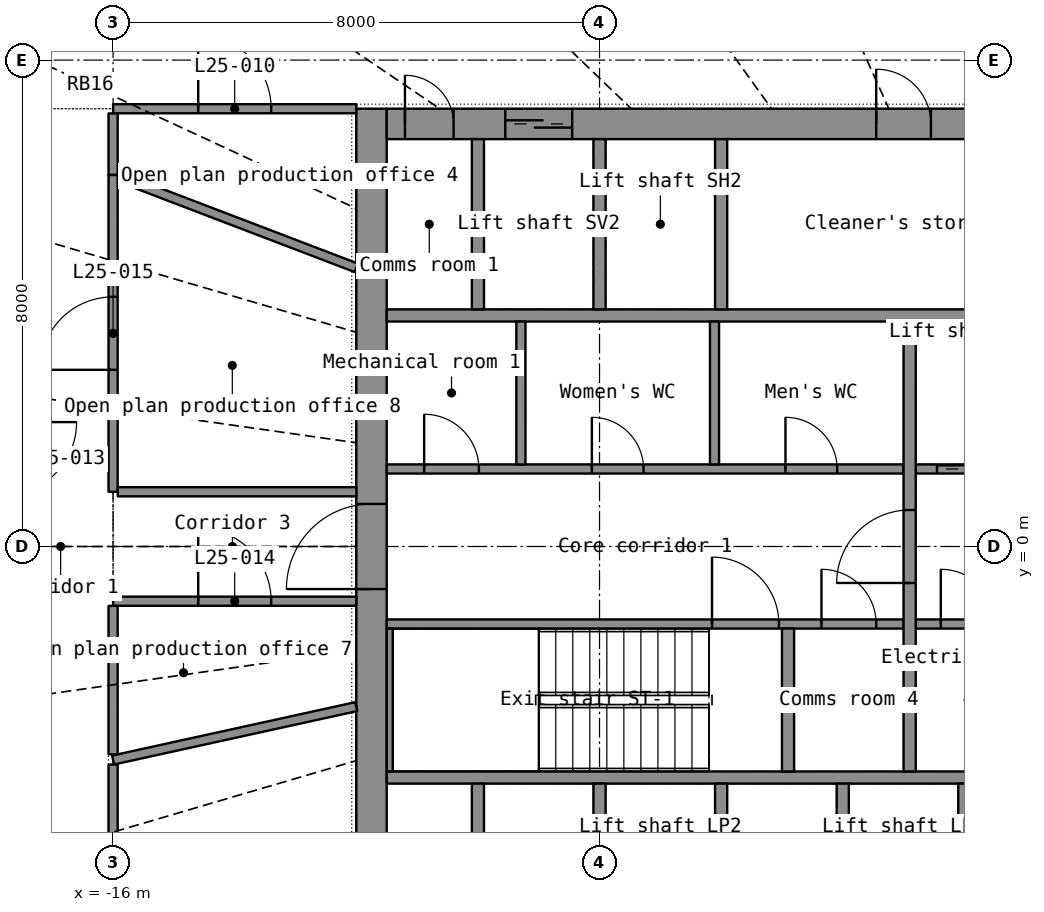
"""IFC4 building model, lengths in metres.
Left out: names, types, materials, properties, quantities, classifications, styles, units other than length and angle.
Written with IfcOpenShell. Run it as: python <this file> out.ifc"""

import sys

from ifc_helpers import new_model, si_unit, direction, frame, frame_2d, origin, place, context, subcontext, project, spatial, rectangle, extrude, element, fill, save


model = new_model("IFC4")
c1 = context("Model", 3, precision=1e-05, world=origin(), true_north=direction((0.0, 1.0)))
c2 = subcontext(c1, "Body", "Model", "MODEL_VIEW")
j1 = project(units=[si_unit("LENGTHUNIT", "METRE"), si_unit("PLANEANGLEUNIT", "RADIAN")], contexts=[c1])
p1 = place(None, origin())
s1 = spatial("IfcSite", under=j1, at=p1, CompositionType="ELEMENT")
p2 = place(p1, origin())
s2 = spatial("IfcBuilding", under=s1, at=p2, CompositionType="ELEMENT")
p3 = place(p2, frame((0.0, 0.0, 108.2)))
s3 = spatial("IfcBuildingStorey", under=s2, at=p3, CompositionType="ELEMENT", Elevation=108.2)
p4 = place(p3, frame((-11.75, -7.2, 0.0), z_axis=(0.0, 0.0, 1.0), x_axis=(0.0, 1.0, 0.0)))
e1 = element("IfcWall", 1, at=p4, inside=s3, PredefinedType="SHEAR", context=c2, shape_type="SweptSolid", body=[
    extrude(rectangle(XDim=14.4, YDim=0.5, at=frame_2d((7.2, 0.0))), origin(), (0.0, 0.0, 1.0), 3.3),
])
p5 = place(p4, frame((6.5, 0.0, 0.0)))
e2 = element("IfcOpeningElement", 2, at=p5, cuts=e1, PredefinedType="OPENING", context=c2, shape_type="SweptSolid", body=[
    extrude(rectangle(XDim=1.4, YDim=2.2, at=frame_2d((0.7, 1.1))), frame((0.0, 0.26, 0.0), z_axis=(0.0, -1.0, 0.0), x_axis=(1.0, 0.0, 0.0)), (0.0, 0.0, 1.0), 0.52),
])
p6 = place(p3, frame((-11.5, 6.95, 0.0), z_axis=(0.0, 0.0, 1.0), x_axis=(1.0, 0.0, 0.0)))
e3 = element("IfcWall", 3, at=p6, inside=s3, PredefinedType="SHEAR", context=c2, shape_type="SweptSolid", body=[
    extrude(rectangle(XDim=23.0, YDim=0.5, at=frame_2d((11.5, 0.0))), origin(), (0.0, 0.0, 1.0), 3.3),
])
p7 = place(p6, frame((1.95, 0.0, 0.0)))
e4 = element("IfcOpeningElement", 4, at=p7, cuts=e3, PredefinedType="OPENING", context=c2, shape_type="SweptSolid", body=[
    extrude(rectangle(XDim=1.1, YDim=2.2, at=frame_2d((0.55, 1.1))), frame((0.0, 0.26, 0.0), z_axis=(0.0, -1.0, 0.0), x_axis=(1.0, 0.0, 0.0)), (0.0, 0.0, 1.0), 0.52),
])
p8 = place(p6, frame((8.05, 0.0, 0.0)))
e5 = element("IfcOpeningElement", 5, at=p8, cuts=e3, PredefinedType="OPENING", context=c2, shape_type="SweptSolid", body=[
    extrude(rectangle(XDim=0.9, YDim=2.1, at=frame_2d((0.45, 1.05))), frame((0.0, 0.26, 0.0), z_axis=(0.0, -1.0, 0.0), x_axis=(1.0, 0.0, 0.0)), (0.0, 0.0, 1.0), 0.52),
])
p9 = place(p6, frame((13.05, 0.0, 0.0)))
e6 = element("IfcOpeningElement", 6, at=p9, cuts=e3, PredefinedType="OPENING", context=c2, shape_type="SweptSolid", body=[
    extrude(rectangle(XDim=0.9, YDim=2.1, at=frame_2d((0.45, 1.05))), frame((0.0, 0.26, 0.0), z_axis=(0.0, -1.0, 0.0), x_axis=(1.0, 0.0, 0.0)), (0.0, 0.0, 1.0), 0.52),
])
p10 = place(p6, frame((18.05, 0.0, 0.0)))
e7 = element("IfcOpeningElement", 7, at=p10, cuts=e3, PredefinedType="OPENING", context=c2, shape_type="SweptSolid", body=[
    extrude(rectangle(XDim=0.9, YDim=2.1, at=frame_2d((0.45, 1.05))), frame((0.0, 0.26, 0.0), z_axis=(0.0, -1.0, 0.0), x_axis=(1.0, 0.0, 0.0)), (0.0, 0.0, 1.0), 0.52),
])
p11 = place(p6, frame((0.3, 0.0, 0.0)))
e8 = element("IfcOpeningElement", 8, at=p11, cuts=e3, PredefinedType="OPENING", context=c2, shape_type="SweptSolid", body=[
    extrude(rectangle(XDim=0.8, YDim=2.05, at=frame_2d((0.4, 1.025))), frame((0.0, 0.26, 0.0), z_axis=(0.0, -1.0, 0.0), x_axis=(1.0, 0.0, 0.0)), (0.0, 0.0, 1.0), 0.52),
])
p12 = place(p6, frame((21.9, 0.0, 0.0)))
e9 = element("IfcOpeningElement", 9, at=p12, cuts=e3, PredefinedType="OPENING", context=c2, shape_type="SweptSolid", body=[
    extrude(rectangle(XDim=0.8, YDim=2.05, at=frame_2d((0.4, 1.025))), frame((0.0, 0.26, 0.0), z_axis=(0.0, -1.0, 0.0), x_axis=(1.0, 0.0, 0.0)), (0.0, 0.0, 1.0), 0.52),
])
for number, where, z_axis, x_axis in (
    (10, (-11.5, -3.8, 0.0), (0.0, 0.0, 1.0), (1.0, 0.0, 0.0)),
    (11, (-11.5, 3.8, 0.0), (0.0, 0.0, 1.0), (1.0, 0.0, 0.0)),
):
    element("IfcWall", number, at=place(p3, frame(where, z_axis=z_axis, x_axis=x_axis)), inside=s3, PredefinedType="SHEAR", context=c2, shape_type="SweptSolid", body=[
        extrude(rectangle(XDim=23.0, YDim=0.2, at=frame_2d((11.5, 0.0))), origin(), (0.0, 0.0, 1.0), 3.3),
    ])
for number, where, z_axis, x_axis in (
    (12, (-10.0, -6.7, 0.0), (0.0, 0.0, 1.0), (0.0, 1.0, 0.0)),
    (13, (-8.0, -6.7, 0.0), (0.0, 0.0, 1.0), (0.0, 1.0, 0.0)),
    (14, (-6.0, -6.7, 0.0), (0.0, 0.0, 1.0), (0.0, 1.0, 0.0)),
    (15, (-4.0, -6.7, 0.0), (0.0, 0.0, 1.0), (0.0, 1.0, 0.0)),
    (16, (-2.0, -6.7, 0.0), (0.0, 0.0, 1.0), (0.0, 1.0, 0.0)),
    (17, (-10.0, 3.9, 0.0), (0.0, 0.0, 1.0), (0.0, 1.0, 0.0)),
    (18, (-8.0, 3.9, 0.0), (0.0, 0.0, 1.0), (0.0, 1.0, 0.0)),
    (19, (-6.0, 3.9, 0.0), (0.0, 0.0, 1.0), (0.0, 1.0, 0.0)),
):
    element("IfcWall", number, at=place(p3, frame(where, z_axis=z_axis, x_axis=x_axis)), inside=s3, PredefinedType="SHEAR", context=c2, shape_type="SweptSolid", body=[
        extrude(rectangle(XDim=2.8, YDim=0.2, at=frame_2d((1.4, 0.0))), origin(), (0.0, 0.0, 1.0), 3.3),
    ])
p13 = place(p3, frame((-11.5, -1.275, 0.0), z_axis=(0.0, 0.0, 1.0), x_axis=(1.0, 0.0, 0.0)))
e20 = element("IfcWall", 20, at=p13, inside=s3, PredefinedType="SHEAR", context=c2, shape_type="SweptSolid", body=[
    extrude(rectangle(XDim=8.5, YDim=0.15, at=frame_2d((4.25, 0.0))), origin(), (0.0, 0.0, 1.0), 3.3),
])
p14 = place(p13, frame((5.35, 0.0, 0.0)))
e21 = element("IfcOpeningElement", 21, at=p14, cuts=e20, PredefinedType="OPENING", context=c2, shape_type="SweptSolid", body=[
    extrude(rectangle(XDim=1.1, YDim=2.15, at=frame_2d((0.55, 1.075))), frame((0.0, 0.085, 0.0), z_axis=(0.0, -1.0, 0.0), x_axis=(1.0, 0.0, 0.0)), (0.0, 0.0, 1.0), 0.17),
])
p15 = place(p13, frame((7.15, 0.0, 0.0)))
e22 = element("IfcOpeningElement", 22, at=p15, cuts=e20, PredefinedType="OPENING", context=c2, shape_type="SweptSolid", body=[
    extrude(rectangle(XDim=0.9, YDim=2.1, at=frame_2d((0.45, 1.05))), frame((0.0, 0.085, 0.0), z_axis=(0.0, -1.0, 0.0), x_axis=(1.0, 0.0, 0.0)), (0.0, 0.0, 1.0), 0.17),
])
p16 = place(p3, frame((-2.8, -1.275, 0.0), z_axis=(0.0, 0.0, 1.0), x_axis=(1.0, 0.0, 0.0)))
e23 = element("IfcWall", 23, at=p16, inside=s3, PredefinedType="SHEAR", context=c2, shape_type="SweptSolid", body=[
    extrude(rectangle(XDim=5.6, YDim=0.15, at=frame_2d((2.8, 0.0))), origin(), (0.0, 0.0, 1.0), 3.3),
])
p17 = place(p16, frame((4.15, 0.0, 0.0)))
e24 = element("IfcOpeningElement", 24, at=p17, cuts=e23, PredefinedType="OPENING", context=c2, shape_type="SweptSolid", body=[
    extrude(rectangle(XDim=1.1, YDim=2.2, at=frame_2d((0.55, 1.1))), frame((0.0, 0.085, 0.0), z_axis=(0.0, -1.0, 0.0), x_axis=(1.0, 0.0, 0.0)), (0.0, 0.0, 1.0), 0.17),
])
p18 = place(p16, frame((0.413, 0.0, 0.0)))
e25 = element("IfcOpeningElement", 25, at=p18, cuts=e23, PredefinedType="OPENING", context=c2, shape_type="SweptSolid", body=[
    extrude(rectangle(XDim=0.9, YDim=2.1, at=frame_2d((0.45, 1.05))), frame((0.0, 0.085, 0.0), z_axis=(0.0, -1.0, 0.0), x_axis=(1.0, 0.0, 0.0)), (0.0, 0.0, 1.0), 0.17),
])
p19 = place(p16, frame((2.288, 0.0, 0.0)))
e26 = element("IfcOpeningElement", 26, at=p19, cuts=e23, PredefinedType="OPENING", context=c2, shape_type="SweptSolid", body=[
    extrude(rectangle(XDim=0.9, YDim=2.1, at=frame_2d((0.45, 1.05))), frame((0.0, 0.085, 0.0), z_axis=(0.0, -1.0, 0.0), x_axis=(1.0, 0.0, 0.0)), (0.0, 0.0, 1.0), 0.17),
])
p20 = place(p3, frame((-11.5, 1.275, 0.0), z_axis=(0.0, 0.0, 1.0), x_axis=(1.0, 0.0, 0.0)))
e27 = element("IfcWall", 27, at=p20, inside=s3, PredefinedType="PARTITIONING", context=c2, shape_type="SweptSolid", body=[
    extrude(rectangle(XDim=8.5, YDim=0.15, at=frame_2d((4.25, 0.0))), origin(), (0.0, 0.0, 1.0), 3.3),
])
p21 = place(p20, frame((0.616, 0.0, 0.0)))
e28 = element("IfcOpeningElement", 28, at=p21, cuts=e27, PredefinedType="OPENING", context=c2, shape_type="SweptSolid", body=[
    extrude(rectangle(XDim=0.9, YDim=2.1, at=frame_2d((0.45, 1.05))), frame((0.0, 0.085, 0.0), z_axis=(0.0, -1.0, 0.0), x_axis=(1.0, 0.0, 0.0)), (0.0, 0.0, 1.0), 0.17),
])
p22 = place(p20, frame((3.374, 0.0, 0.0)))
e29 = element("IfcOpeningElement", 29, at=p22, cuts=e27, PredefinedType="OPENING", context=c2, shape_type="SweptSolid", body=[
    extrude(rectangle(XDim=0.85, YDim=2.1, at=frame_2d((0.425, 1.05))), frame((0.0, 0.085, 0.0), z_axis=(0.0, -1.0, 0.0), x_axis=(1.0, 0.0, 0.0)), (0.0, 0.0, 1.0), 0.17),
])
p23 = place(p20, frame((6.558, 0.0, 0.0)))
e30 = element("IfcOpeningElement", 30, at=p23, cuts=e27, PredefinedType="OPENING", context=c2, shape_type="SweptSolid", body=[
    extrude(rectangle(XDim=0.85, YDim=2.1, at=frame_2d((0.425, 1.05))), frame((0.0, 0.085, 0.0), z_axis=(0.0, -1.0, 0.0), x_axis=(1.0, 0.0, 0.0)), (0.0, 0.0, 1.0), 0.17),
])
p24 = place(p3, frame((-2.8, 1.275, 0.0), z_axis=(0.0, 0.0, 1.0), x_axis=(1.0, 0.0, 0.0)))
e31 = element("IfcWall", 31, at=p24, inside=s3, PredefinedType="SHEAR", context=c2, shape_type="SweptSolid", body=[
    extrude(rectangle(XDim=5.6, YDim=0.15, at=frame_2d((2.8, 0.0))), origin(), (0.0, 0.0, 1.0), 3.3),
])
p25 = place(p24, frame((0.35, 0.0, 0.0)))
e32 = element("IfcOpeningElement", 32, at=p25, cuts=e31, PredefinedType="OPENING", context=c2, shape_type="SweptSolid", body=[
    extrude(rectangle(XDim=1.1, YDim=2.2, at=frame_2d((0.55, 1.1))), frame((0.0, 0.085, 0.0), z_axis=(0.0, -1.0, 0.0), x_axis=(1.0, 0.0, 0.0)), (0.0, 0.0, 1.0), 0.17),
])
p26 = place(p24, frame((3.35, 0.0, 0.0)))
e33 = element("IfcOpeningElement", 33, at=p26, cuts=e31, PredefinedType="OPENING", context=c2, shape_type="SweptSolid", body=[
    extrude(rectangle(XDim=0.9, YDim=2.1, at=frame_2d((0.45, 1.05))), frame((0.0, 0.085, 0.0), z_axis=(0.0, -1.0, 0.0), x_axis=(1.0, 0.0, 0.0)), (0.0, 0.0, 1.0), 0.17),
])
p27 = place(p3, frame((-2.9, -3.7, 0.0), z_axis=(0.0, 0.0, 1.0), x_axis=(0.0, 1.0, 0.0)))
e34 = element("IfcWall", 34, at=p27, inside=s3, PredefinedType="SHEAR", context=c2, shape_type="SweptSolid", body=[
    extrude(rectangle(XDim=7.4, YDim=0.2, at=frame_2d((3.7, 0.0))), origin(), (0.0, 0.0, 1.0), 3.3),
])
p28 = place(p27, frame((3.1, 0.0, 0.0)))
e35 = element("IfcOpeningElement", 35, at=p28, cuts=e34, PredefinedType="OPENING", context=c2, shape_type="SweptSolid", body=[
    extrude(rectangle(XDim=1.2, YDim=2.2, at=frame_2d((0.6, 1.1))), frame((0.0, 0.11, 0.0), z_axis=(0.0, -1.0, 0.0), x_axis=(1.0, 0.0, 0.0)), (0.0, 0.0, 1.0), 0.22),
])
p29 = place(p3, frame((-11.45, -3.7, 0.0), z_axis=(0.0, 0.0, 1.0), x_axis=(0.0, 1.0, 0.0)))
e36 = element("IfcWall", 36, at=p29, inside=s3, PredefinedType="SHEAR", context=c2, shape_type="SweptSolid", body=[
    extrude(rectangle(XDim=2.35, YDim=0.1, at=frame_2d((1.175, 0.0))), origin(), (0.0, 0.0, 1.0), 3.3),
])
p30 = place(p3, frame((-4.9, -3.7, 0.0), z_axis=(0.0, 0.0, 1.0), x_axis=(0.0, 1.0, 0.0)))
e37 = element("IfcWall", 37, at=p30, inside=s3, PredefinedType="SHEAR", context=c2, shape_type="SweptSolid", body=[
    extrude(rectangle(XDim=2.35, YDim=0.2, at=frame_2d((1.175, 0.0))), origin(), (0.0, 0.0, 1.0), 3.3),
])
for number, where, z_axis, x_axis in (
    (38, (-9.293, 1.35, 0.0), (0.0, 0.0, 1.0), (0.0, 1.0, 0.0)),
    (39, (-6.109, 1.35, 0.0), (0.0, 0.0, 1.0), (0.0, 1.0, 0.0)),
):
    element("IfcWall", number, at=place(p3, frame(where, z_axis=z_axis, x_axis=x_axis)), inside=s3, PredefinedType="PARTITIONING", context=c2, shape_type="SweptSolid", body=[
        extrude(rectangle(XDim=2.35, YDim=0.15, at=frame_2d((1.175, 0.0))), origin(), (0.0, 0.0, 1.0), 3.3),
    ])
p31 = place(p3, frame((-16.0, 0.9, 0.0), z_axis=(0.0, 0.0, 1.0), x_axis=(0.0, 1.0, 0.0)))
e40 = element("IfcWall", 40, at=p31, inside=s3, PredefinedType="PARTITIONING", context=c2, shape_type="SweptSolid", body=[
    extrude(rectangle(XDim=5.211, YDim=0.15, at=frame_2d((2.606, 0.0))), origin(), (0.0, 0.0, 1.0), 2.4),
])
p32 = place(p31, frame((2.006, 0.0, 0.0)))
e41 = element("IfcOpeningElement", 41, at=p32, cuts=e40, PredefinedType="OPENING", context=c2, shape_type="SweptSolid", body=[
    extrude(rectangle(XDim=1.2, YDim=2.2, at=frame_2d((0.6, 1.1))), frame((0.0, 0.085, 0.0), z_axis=(0.0, -1.0, 0.0), x_axis=(1.0, 0.0, 0.0)), (0.0, 0.0, 1.0), 0.17),
])
p33 = place(p3, frame((-15.896, 6.072, 0.0), z_axis=(0.0, 0.0, 1.0), x_axis=(0.934175823, -0.356813021, 0.0)))
e42 = element("IfcWall", 42, at=p33, inside=s3, PredefinedType="PARTITIONING", context=c2, shape_type="SweptSolid", body=[
    extrude(rectangle(XDim=4.171, YDim=0.15, at=frame_2d((2.085, 0.0))), origin(), (0.0, 0.0, 1.0), 2.4),
])
p34 = place(p3, frame((-16.0, -3.512, 0.0), z_axis=(0.0, 0.0, 1.0), x_axis=(0.976750433, 0.214379551, 0.0)))
e43 = element("IfcWall", 43, at=p34, inside=s3, PredefinedType="PARTITIONING", context=c2, shape_type="SweptSolid", body=[
    extrude(rectangle(XDim=4.095, YDim=0.15, at=frame_2d((2.048, 0.0))), origin(), (0.0, 0.0, 1.0), 2.4),
])
p35 = place(p3, frame((-16.0, -0.9, 0.0), z_axis=(0.0, 0.0, 1.0), x_axis=(1.0, 0.0, 0.0)))
e44 = element("IfcWall", 44, at=p35, inside=s3, PredefinedType="PARTITIONING", context=c2, shape_type="SweptSolid", body=[
    extrude(rectangle(XDim=4.0, YDim=0.15, at=frame_2d((2.0, 0.0))), origin(), (0.0, 0.0, 1.0), 2.4),
])
p36 = place(p35, frame((1.4, 0.0, 0.0)))
e45 = element("IfcOpeningElement", 45, at=p36, cuts=e44, PredefinedType="OPENING", context=c2, shape_type="SweptSolid", body=[
    extrude(rectangle(XDim=1.2, YDim=2.2, at=frame_2d((0.6, 1.1))), frame((0.0, 0.085, 0.0), z_axis=(0.0, -1.0, 0.0), x_axis=(1.0, 0.0, 0.0)), (0.0, 0.0, 1.0), 0.17),
])
p37 = place(p3, frame((-16.0, 7.2, 0.0), z_axis=(0.0, 0.0, 1.0), x_axis=(1.0, 0.0, 0.0)))
e46 = element("IfcWall", 46, at=p37, inside=s3, PredefinedType="PARTITIONING", context=c2, shape_type="SweptSolid", body=[
    extrude(rectangle(XDim=4.0, YDim=0.15, at=frame_2d((2.0, 0.0))), origin(), (0.0, 0.0, 1.0), 2.4),
])
p38 = place(p37, frame((1.4, 0.0, 0.0)))
e47 = element("IfcOpeningElement", 47, at=p38, cuts=e46, PredefinedType="OPENING", context=c2, shape_type="SweptSolid", body=[
    extrude(rectangle(XDim=1.2, YDim=2.2, at=frame_2d((0.6, 1.1))), frame((0.0, 0.085, 0.0), z_axis=(0.0, -1.0, 0.0), x_axis=(1.0, 0.0, 0.0)), (0.0, 0.0, 1.0), 0.17),
])
p39 = place(p3, frame((-12.0, 0.9, 0.0), z_axis=(0.0, 0.0, 1.0), x_axis=(-1.0, 0.0, 0.0)))
e48 = element("IfcWall", 48, at=p39, inside=s3, PredefinedType="PARTITIONING", context=c2, shape_type="SweptSolid", body=[
    extrude(rectangle(XDim=3.923, YDim=0.15, at=frame_2d((1.961, 0.0))), origin(), (0.0, 0.0, 1.0), 2.4),
])
p40 = place(p3, frame((-16.0, -7.123, 0.0), z_axis=(0.0, 0.0, 1.0), x_axis=(0.0, 1.0, 0.0)))
e49 = element("IfcWall", 49, at=p40, inside=s3, PredefinedType="PARTITIONING", context=c2, shape_type="SweptSolid", body=[
    extrude(rectangle(XDim=3.536, YDim=0.15, at=frame_2d((1.768, 0.0))), origin(), (0.0, 0.0, 1.0), 2.4),
])
p41 = place(p3, frame((-16.0, -3.417, 0.0), z_axis=(0.0, 0.0, 1.0), x_axis=(0.0, 1.0, 0.0)))
e50 = element("IfcWall", 50, at=p41, inside=s3, PredefinedType="PARTITIONING", context=c2, shape_type="SweptSolid", body=[
    extrude(rectangle(XDim=2.439, YDim=0.15, at=frame_2d((1.22, 0.0))), origin(), (0.0, 0.0, 1.0), 2.4),
])
p42 = place(p3, frame((-16.0, 6.112, 0.0), z_axis=(0.0, 0.0, 1.0), x_axis=(0.0, 1.0, 0.0)))
e51 = element("IfcWall", 51, at=p42, inside=s3, PredefinedType="PARTITIONING", context=c2, shape_type="SweptSolid", body=[
    extrude(rectangle(XDim=1.011, YDim=0.15, at=frame_2d((0.505, 0.0))), origin(), (0.0, 0.0, 1.0), 2.4),
])
p43 = place(p7, origin())
e52 = element("IfcDoor", 52, at=p43, inside=s3, OperationType="DOUBLE_DOOR_SLIDING", PredefinedType="DOOR", context=c2, shape_type="SweptSolid", body=[
    extrude(rectangle(XDim=1.1, YDim=2.2, at=frame_2d((0.55, 1.1))), frame((0.0, 0.025, 0.0), z_axis=(0.0, -1.0, 0.0), x_axis=(1.0, 0.0, 0.0)), (0.0, 0.0, 1.0), 0.05),
])
fill(e4, e52)
p44 = place(p8, origin())
e53 = element("IfcDoor", 53, at=p44, inside=s3, OperationType="SINGLE_SWING_LEFT", PredefinedType="DOOR", context=c2, shape_type="SweptSolid", body=[
    extrude(rectangle(XDim=0.9, YDim=2.1, at=frame_2d((0.45, 1.05))), frame((0.0, 0.025, 0.0), z_axis=(0.0, -1.0, 0.0), x_axis=(1.0, 0.0, 0.0)), (0.0, 0.0, 1.0), 0.05),
])
fill(e5, e53)
p45 = place(p11, origin())
e54 = element("IfcDoor", 54, at=p45, inside=s3, OperationType="SINGLE_SWING_LEFT", PredefinedType="DOOR", context=c2, shape_type="SweptSolid", body=[
    extrude(rectangle(XDim=0.8, YDim=2.05, at=frame_2d((0.4, 1.025))), frame((0.0, 0.025, 0.0), z_axis=(0.0, -1.0, 0.0), x_axis=(1.0, 0.0, 0.0)), (0.0, 0.0, 1.0), 0.05),
])
fill(e8, e54)
p46 = place(p5, origin())
e55 = element("IfcDoor", 55, at=p46, inside=s3, OperationType="DOUBLE_DOOR_SINGLE_SWING", PredefinedType="DOOR", context=c2, shape_type="SweptSolid", body=[
    extrude(rectangle(XDim=1.4, YDim=2.2, at=frame_2d((0.7, 1.1))), frame((0.0, 0.025, 0.0), z_axis=(0.0, -1.0, 0.0), x_axis=(1.0, 0.0, 0.0)), (0.0, 0.0, 1.0), 0.05),
])
fill(e2, e55)
p47 = place(p28, origin())
e56 = element("IfcDoor", 56, at=p47, inside=s3, OperationType="SINGLE_SWING_LEFT", PredefinedType="DOOR", context=c2, shape_type="SweptSolid", body=[
    extrude(rectangle(XDim=1.2, YDim=2.2, at=frame_2d((0.6, 1.1))), frame((0.0, 0.025, 0.0), z_axis=(0.0, -1.0, 0.0), x_axis=(1.0, 0.0, 0.0)), (0.0, 0.0, 1.0), 0.05),
])
fill(e35, e56)
p48 = place(p25, origin())
e57 = element("IfcDoor", 57, at=p48, inside=s3, OperationType="DOUBLE_DOOR_SLIDING", PredefinedType="DOOR", context=c2, shape_type="SweptSolid", body=[
    extrude(rectangle(XDim=1.1, YDim=2.2, at=frame_2d((0.55, 1.1))), frame((0.0, 0.025, 0.0), z_axis=(0.0, -1.0, 0.0), x_axis=(1.0, 0.0, 0.0)), (0.0, 0.0, 1.0), 0.05),
])
fill(e32, e57)
p49 = place(p14, origin())
e58 = element("IfcDoor", 58, at=p49, inside=s3, OperationType="SINGLE_SWING_LEFT", PredefinedType="DOOR", context=c2, shape_type="SweptSolid", body=[
    extrude(rectangle(XDim=1.1, YDim=2.15, at=frame_2d((0.55, 1.075))), frame((0.0, 0.025, 0.0), z_axis=(0.0, -1.0, 0.0), x_axis=(1.0, 0.0, 0.0)), (0.0, 0.0, 1.0), 0.05),
])
fill(e21, e58)
p50 = place(p21, origin())
e59 = element("IfcDoor", 59, at=p50, inside=s3, OperationType="SINGLE_SWING_LEFT", PredefinedType="DOOR", context=c2, shape_type="SweptSolid", body=[
    extrude(rectangle(XDim=0.9, YDim=2.1, at=frame_2d((0.45, 1.05))), frame((0.0, 0.025, 0.0), z_axis=(0.0, -1.0, 0.0), x_axis=(1.0, 0.0, 0.0)), (0.0, 0.0, 1.0), 0.05),
])
fill(e28, e59)
p51 = place(p22, origin())
e60 = element("IfcDoor", 60, at=p51, inside=s3, OperationType="SINGLE_SWING_LEFT", PredefinedType="DOOR", context=c2, shape_type="SweptSolid", body=[
    extrude(rectangle(XDim=0.85, YDim=2.1, at=frame_2d((0.425, 1.05))), frame((0.0, 0.025, 0.0), z_axis=(0.0, -1.0, 0.0), x_axis=(1.0, 0.0, 0.0)), (0.0, 0.0, 1.0), 0.05),
])
fill(e29, e60)
p52 = place(p23, origin())
e61 = element("IfcDoor", 61, at=p52, inside=s3, OperationType="SINGLE_SWING_LEFT", PredefinedType="DOOR", context=c2, shape_type="SweptSolid", body=[
    extrude(rectangle(XDim=0.85, YDim=2.1, at=frame_2d((0.425, 1.05))), frame((0.0, 0.025, 0.0), z_axis=(0.0, -1.0, 0.0), x_axis=(1.0, 0.0, 0.0)), (0.0, 0.0, 1.0), 0.05),
])
fill(e30, e61)
p53 = place(p18, origin())
e62 = element("IfcDoor", 62, at=p53, inside=s3, OperationType="SINGLE_SWING_LEFT", PredefinedType="DOOR", context=c2, shape_type="SweptSolid", body=[
    extrude(rectangle(XDim=0.9, YDim=2.1, at=frame_2d((0.45, 1.05))), frame((0.0, 0.025, 0.0), z_axis=(0.0, -1.0, 0.0), x_axis=(1.0, 0.0, 0.0)), (0.0, 0.0, 1.0), 0.05),
])
fill(e25, e62)
p54 = place(p15, origin())
e63 = element("IfcDoor", 63, at=p54, inside=s3, OperationType="SINGLE_SWING_LEFT", PredefinedType="DOOR", context=c2, shape_type="SweptSolid", body=[
    extrude(rectangle(XDim=0.9, YDim=2.1, at=frame_2d((0.45, 1.05))), frame((0.0, 0.025, 0.0), z_axis=(0.0, -1.0, 0.0), x_axis=(1.0, 0.0, 0.0)), (0.0, 0.0, 1.0), 0.05),
])
fill(e22, e63)
p55 = place(p38, origin())
e64 = element("IfcDoor", 64, at=p55, inside=s3, OperationType="DOUBLE_DOOR_SINGLE_SWING", PredefinedType="DOOR", context=c2, shape_type="SweptSolid", body=[
    extrude(rectangle(XDim=1.2, YDim=2.2, at=frame_2d((0.6, 1.1))), frame((0.0, 0.025, 0.0), z_axis=(0.0, -1.0, 0.0), x_axis=(1.0, 0.0, 0.0)), (0.0, 0.0, 1.0), 0.05),
])
fill(e47, e64)
p56 = place(p36, origin())
e65 = element("IfcDoor", 65, at=p56, inside=s3, OperationType="DOUBLE_DOOR_SINGLE_SWING", PredefinedType="DOOR", context=c2, shape_type="SweptSolid", body=[
    extrude(rectangle(XDim=1.2, YDim=2.2, at=frame_2d((0.6, 1.1))), frame((0.0, 0.025, 0.0), z_axis=(0.0, -1.0, 0.0), x_axis=(1.0, 0.0, 0.0)), (0.0, 0.0, 1.0), 0.05),
])
fill(e45, e65)
p57 = place(p32, origin())
e66 = element("IfcDoor", 66, at=p57, inside=s3, OperationType="DOUBLE_DOOR_SINGLE_SWING", PredefinedType="DOOR", context=c2, shape_type="SweptSolid", body=[
    extrude(rectangle(XDim=1.2, YDim=2.2, at=frame_2d((0.6, 1.1))), frame((0.0, 0.025, 0.0), z_axis=(0.0, -1.0, 0.0), x_axis=(1.0, 0.0, 0.0)), (0.0, 0.0, 1.0), 0.05),
])
fill(e41, e66)
save(model, sys.argv[1])
